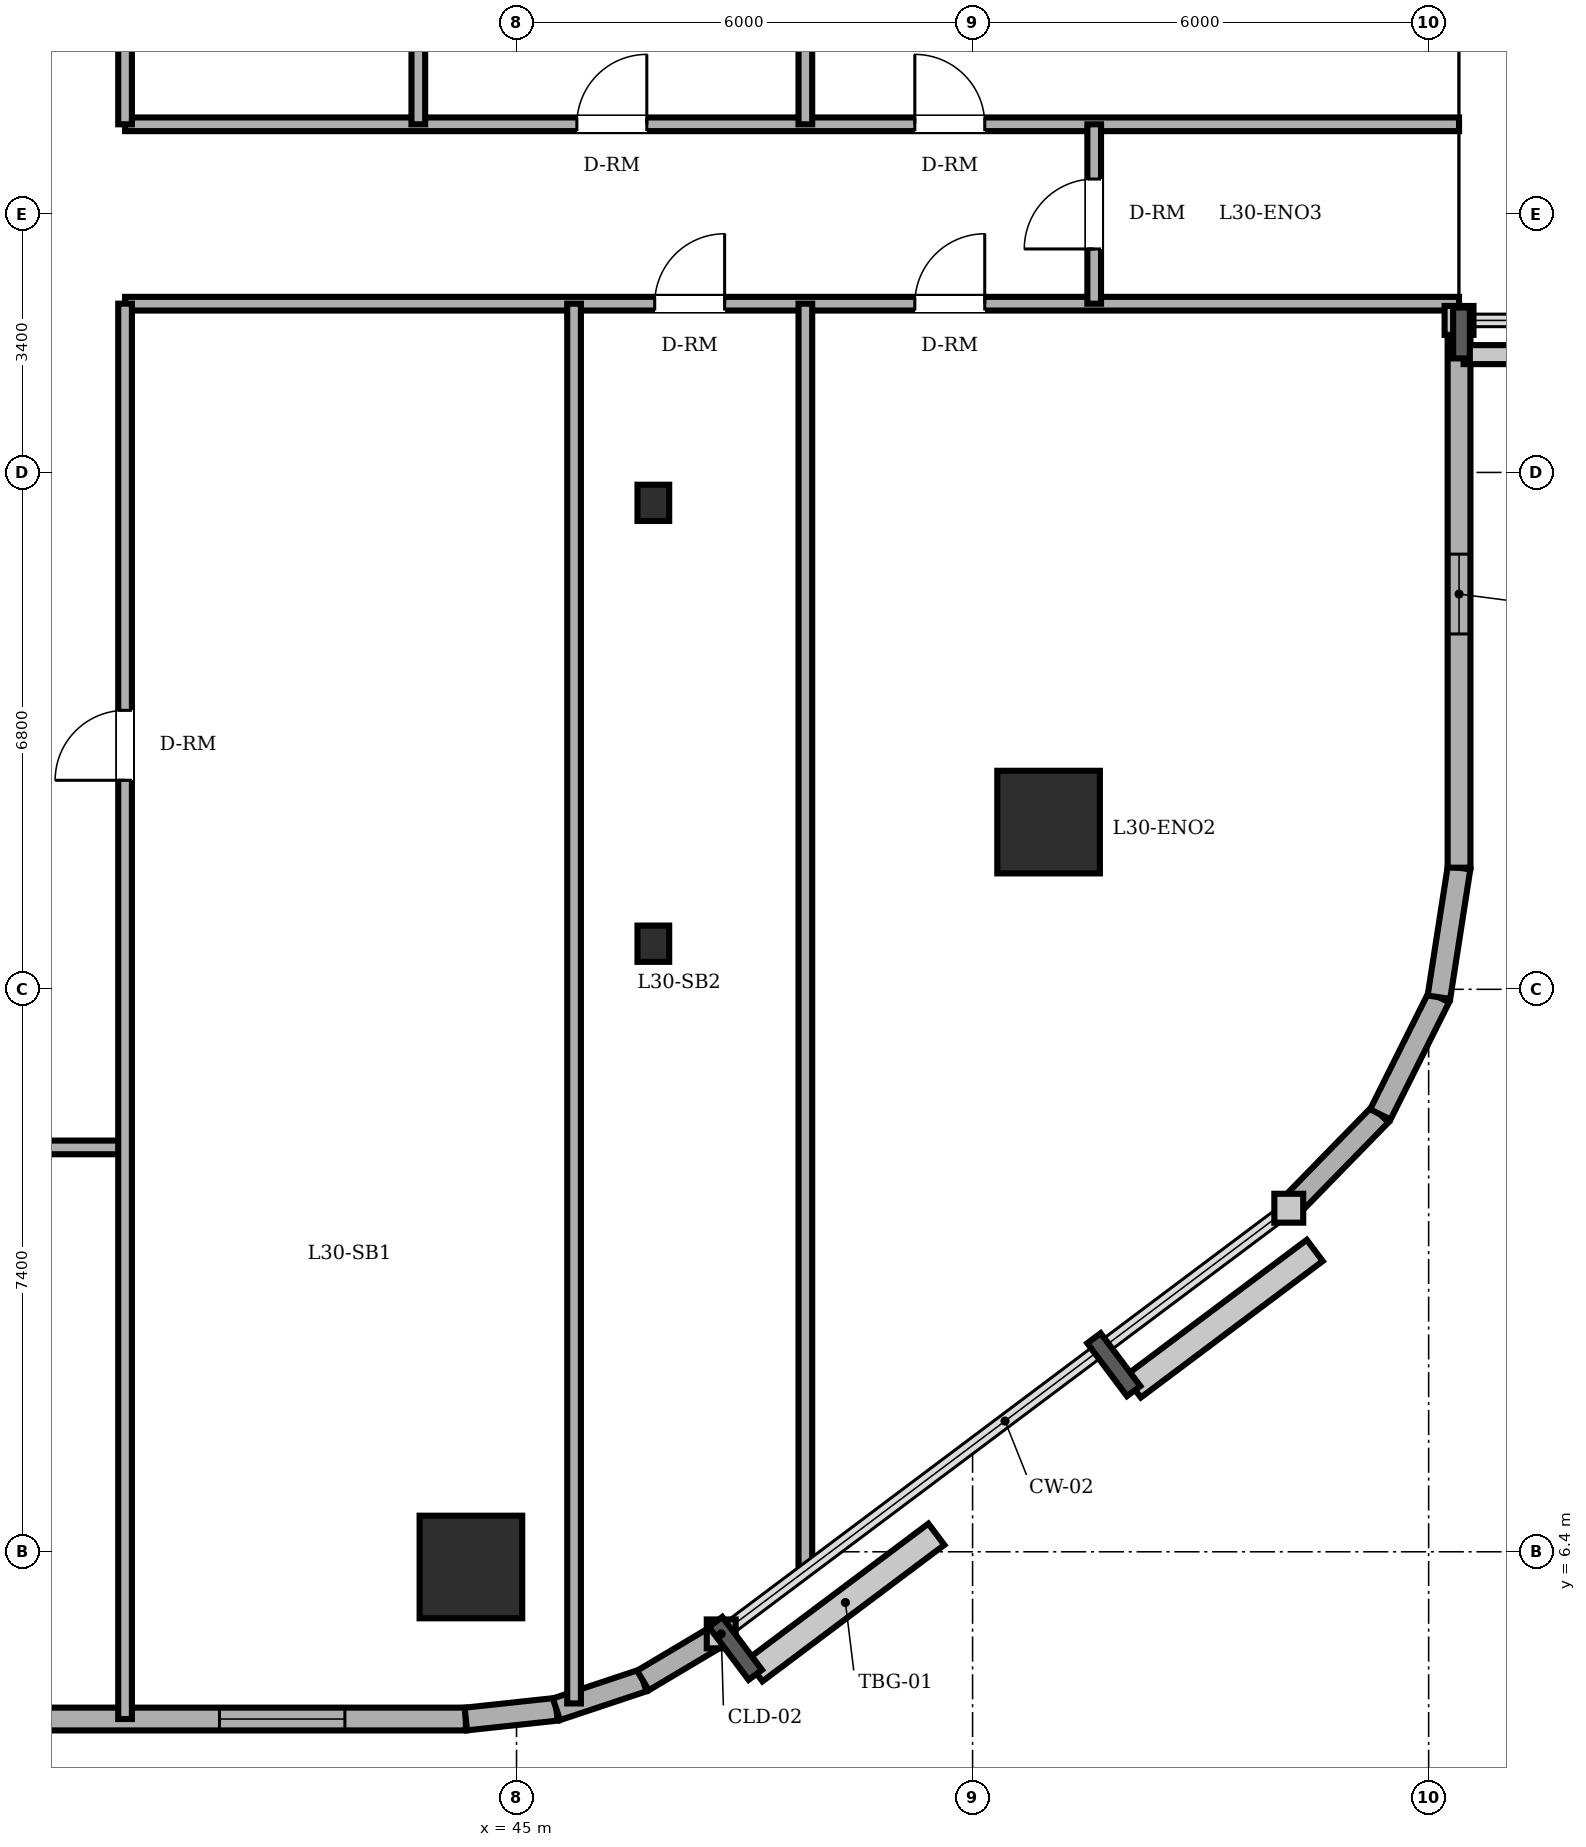
"""IFC4 building model, lengths in metres.
Left out: names, types, materials, properties, quantities, classifications, styles, units other than length and angle.
Written with IfcOpenShell. Run it as: python <this file> out.ifc"""

import sys

from ifc_helpers import new_model, si_unit, direction, frame, frame_2d, origin, origin_2d, place, context, subcontext, project, spatial, rectangle, circle, i_section, extrude, element, fill, save


model = new_model("IFC4")
c1 = context("Model", 3, precision=1e-05, world=origin(), true_north=direction((0.0, 1.0)))
c2 = subcontext(c1, "Body", "Model", "MODEL_VIEW")
j1 = project(units=[si_unit("LENGTHUNIT", "METRE"), si_unit("PLANEANGLEUNIT", "RADIAN")], contexts=[c1])
p1 = place(None, origin())
s1 = spatial("IfcSite", under=j1, at=p1, CompositionType="ELEMENT")
p2 = place(p1, origin())
s2 = spatial("IfcBuilding", under=s1, at=p2, CompositionType="ELEMENT")
p3 = place(p2, frame((0.0, 0.0, 115.1)))
s3 = spatial("IfcBuildingStorey", under=s2, at=p3, CompositionType="ELEMENT", Elevation=115.1)
for number, where, z_axis, x_axis in (
    (1, (44.4, 6.2, 0.0), (0.0, 0.0, 1.0), (1.0, 0.0, 0.0)),
    (2, (52.0, 16.0, 0.0), (0.0, 0.0, 1.0), (1.0, 0.0, 0.0)),
):
    element("IfcColumn", number, at=place(p3, frame(where, z_axis=z_axis, x_axis=x_axis)), inside=s3, PredefinedType="COLUMN", context=c2, shape_type="SweptSolid", body=[
        extrude(circle(Radius=0.675, at=origin_2d()), origin(), (0.0, 0.0, 1.0), 3.6),
    ])
for number, where, z_axis, x_axis in (
    (3, (46.8, 14.4, 0.0), (0.0, 0.0, 1.0), (1.0, 0.0, 0.0)),
    (4, (46.8, 20.2, 0.0), (0.0, 0.0, 1.0), (1.0, 0.0, 0.0)),
):
    element("IfcColumn", number, at=place(p3, frame(where, z_axis=z_axis, x_axis=x_axis)), inside=s3, PredefinedType="COLUMN", context=c2, shape_type="SweptSolid", body=[
        extrude(i_section(OverallWidth=0.417, OverallDepth=0.477, WebThickness=0.036, FlangeThickness=0.057, FilletRadius=0.015, at=origin_2d()), origin(), (0.0, 0.0, 1.0), 3.6),
    ])
p4 = place(p3, frame((14.4, 4.2, 0.0), z_axis=(0.0, 0.0, 1.0), x_axis=(1.0, 0.0, 0.0)))
e5 = element("IfcWall", 5, at=p4, inside=s3, PredefinedType="SOLIDWALL", context=c2, shape_type="SweptSolid", body=[
    extrude(rectangle(XDim=29.933, YDim=0.3, at=frame_2d((14.967, 0.0))), origin(), (0.0, 0.0, 1.0), 3.4),
])
p5 = place(p4, frame((6.725, 0.0, 0.0)))
e6 = element("IfcOpeningElement", 6, at=p5, cuts=e5, PredefinedType="OPENING", context=c2, shape_type="SweptSolid", body=[
    extrude(rectangle(XDim=0.95, YDim=2.2, at=frame_2d((0.475, 1.1))), frame((0.0, 0.16, 0.0), z_axis=(0.0, -1.0, 0.0), x_axis=(1.0, 0.0, 0.0)), (0.0, 0.0, 1.0), 0.32),
])
p6 = place(p4, frame((2.808, 0.0, 0.85)))
e7 = element("IfcOpeningElement", 7, at=p6, cuts=e5, PredefinedType="OPENING", context=c2, shape_type="SweptSolid", body=[
    extrude(rectangle(XDim=1.65, YDim=1.55, at=frame_2d((0.825, 0.775))), frame((0.0, 0.16, 0.0), z_axis=(0.0, -1.0, 0.0), x_axis=(1.0, 0.0, 0.0)), (0.0, 0.0, 1.0), 0.32),
])
p7 = place(p4, frame((11.275, 0.0, 0.85)))
e8 = element("IfcOpeningElement", 8, at=p7, cuts=e5, PredefinedType="OPENING", context=c2, shape_type="SweptSolid", body=[
    extrude(rectangle(XDim=1.65, YDim=1.55, at=frame_2d((0.825, 0.775))), frame((0.0, 0.16, 0.0), z_axis=(0.0, -1.0, 0.0), x_axis=(1.0, 0.0, 0.0)), (0.0, 0.0, 1.0), 0.32),
])
p8 = place(p4, frame((16.992, 0.0, 0.85)))
e9 = element("IfcOpeningElement", 9, at=p8, cuts=e5, PredefinedType="OPENING", context=c2, shape_type="SweptSolid", body=[
    extrude(rectangle(XDim=1.65, YDim=1.55, at=frame_2d((0.825, 0.775))), frame((0.0, 0.16, 0.0), z_axis=(0.0, -1.0, 0.0), x_axis=(1.0, 0.0, 0.0)), (0.0, 0.0, 1.0), 0.32),
])
p9 = place(p4, frame((20.808, 0.0, 0.85)))
e10 = element("IfcOpeningElement", 10, at=p9, cuts=e5, PredefinedType="OPENING", context=c2, shape_type="SweptSolid", body=[
    extrude(rectangle(XDim=1.65, YDim=1.55, at=frame_2d((0.825, 0.775))), frame((0.0, 0.16, 0.0), z_axis=(0.0, -1.0, 0.0), x_axis=(1.0, 0.0, 0.0)), (0.0, 0.0, 1.0), 0.32),
])
p10 = place(p4, frame((26.692, 0.0, 0.85)))
e11 = element("IfcOpeningElement", 11, at=p10, cuts=e5, PredefinedType="OPENING", context=c2, shape_type="SweptSolid", body=[
    extrude(rectangle(XDim=1.65, YDim=1.55, at=frame_2d((0.825, 0.775))), frame((0.0, 0.16, 0.0), z_axis=(0.0, -1.0, 0.0), x_axis=(1.0, 0.0, 0.0)), (0.0, 0.0, 1.0), 0.32),
])
p11 = place(p3, frame((44.333, 4.2, 0.0), z_axis=(0.0, 0.0, 1.0), x_axis=(0.994289103787, 0.106720092254, 0.0)))
e12 = element("IfcWall", 12, at=p11, inside=s3, PredefinedType="SOLIDWALL", context=c2, shape_type="SweptSolid", body=[
    extrude(rectangle(XDim=1.199, YDim=0.3, at=frame_2d((0.599, 0.0))), origin(), (0.0, 0.0, 1.0), 3.4),
])
p12 = place(p3, frame((45.525, 4.328, 0.0), z_axis=(0.0, 0.0, 1.0), x_axis=(0.948744332129, 0.316044604847, 0.0)))
e13 = element("IfcWall", 13, at=p12, inside=s3, PredefinedType="SOLIDWALL", context=c2, shape_type="SweptSolid", body=[
    extrude(rectangle(XDim=1.2, YDim=0.3, at=frame_2d((0.6, 0.0))), origin(), (0.0, 0.0, 1.0), 3.4),
])
p13 = place(p3, frame((46.663, 4.707, 0.0), z_axis=(0.0, 0.0, 1.0), x_axis=(0.859320591642, 0.511437308749, 0.0)))
e14 = element("IfcWall", 14, at=p13, inside=s3, PredefinedType="SOLIDWALL", context=c2, shape_type="SweptSolid", body=[
    extrude(rectangle(XDim=1.199, YDim=0.3, at=frame_2d((0.599, 0.0))), origin(), (0.0, 0.0, 1.0), 3.4),
])
for number, where, z_axis, x_axis in (
    (15, (55.16, 10.92, 0.0), (0.0, 0.0, 1.0), (0.698, 0.716, 0.0)),
    (16, (56.364, 12.154, 0.0), (0.0, 0.0, 1.0), (0.447, 0.894, 0.0)),
):
    element("IfcWall", number, at=place(p3, frame(where, z_axis=z_axis, x_axis=x_axis)), inside=s3, PredefinedType="SOLIDWALL", context=c2, shape_type="SweptSolid", body=[
        extrude(rectangle(XDim=1.724, YDim=0.3, at=frame_2d((0.862, 0.0))), origin(), (0.0, 0.0, 1.0), 3.4),
    ])
p14 = place(p3, frame((57.135, 13.696, 0.0), z_axis=(0.0, 0.0, 1.0), x_axis=(0.153620989032, 0.988129845581, 0.0)))
e17 = element("IfcWall", 17, at=p14, inside=s3, PredefinedType="SOLIDWALL", context=c2, shape_type="SweptSolid", body=[
    extrude(rectangle(XDim=1.724, YDim=0.3, at=frame_2d((0.862, 0.0))), origin(), (0.0, 0.0, 1.0), 3.4),
])
p15 = place(p3, frame((57.4, 15.4, 0.0), z_axis=(0.0, 0.0, 1.0), x_axis=(0.0, 1.0, 0.0)))
e18 = element("IfcWall", 18, at=p15, inside=s3, PredefinedType="SOLIDWALL", context=c2, shape_type="SweptSolid", body=[
    extrude(rectangle(XDim=7.2, YDim=0.3, at=frame_2d((3.6, 0.0))), origin(), (0.0, 0.0, 1.0), 3.4),
])
p16 = place(p15, frame((3.075, 0.0, 0.85)))
e19 = element("IfcOpeningElement", 19, at=p16, cuts=e18, PredefinedType="OPENING", context=c2, shape_type="SweptSolid", body=[
    extrude(rectangle(XDim=1.05, YDim=1.55, at=frame_2d((0.525, 0.775))), frame((0.0, 0.16, 0.0), z_axis=(0.0, -1.0, 0.0), x_axis=(1.0, 0.0, 0.0)), (0.0, 0.0, 1.0), 0.32),
])
p17 = place(p3, frame((8.8, 11.72, 0.0), z_axis=(0.0, 0.0, 1.0), x_axis=(1.0, 0.0, 0.0)))
e20 = element("IfcWall", 20, at=p17, inside=s3, PredefinedType="PARTITIONING", context=c2, shape_type="SweptSolid", body=[
    extrude(rectangle(XDim=31.05, YDim=0.18, at=frame_2d((15.525, 0.0))), origin(), (0.0, 0.0, 1.0), 3.4),
])
p18 = place(p17, frame((17.24, 0.0, 0.0)))
e21 = element("IfcOpeningElement", 21, at=p18, cuts=e20, PredefinedType="OPENING", context=c2, shape_type="SweptSolid", body=[
    extrude(rectangle(XDim=0.92, YDim=2.1, at=frame_2d((0.46, 1.05))), frame((0.0, 0.1, 0.0), z_axis=(0.0, -1.0, 0.0), x_axis=(1.0, 0.0, 0.0)), (0.0, 0.0, 1.0), 0.2),
])
p19 = place(p17, frame((8.04, 0.0, 0.0)))
e22 = element("IfcOpeningElement", 22, at=p19, cuts=e20, PredefinedType="OPENING", context=c2, shape_type="SweptSolid", body=[
    extrude(rectangle(XDim=0.92, YDim=2.1, at=frame_2d((0.46, 1.05))), frame((0.0, 0.1, 0.0), z_axis=(0.0, -1.0, 0.0), x_axis=(1.0, 0.0, 0.0)), (0.0, 0.0, 1.0), 0.2),
])
p20 = place(p17, frame((24.605, 0.0, 0.0)))
e23 = element("IfcOpeningElement", 23, at=p20, cuts=e20, PredefinedType="OPENING", context=c2, shape_type="SweptSolid", body=[
    extrude(rectangle(XDim=0.92, YDim=2.1, at=frame_2d((0.46, 1.05))), frame((0.0, 0.1, 0.0), z_axis=(0.0, -1.0, 0.0), x_axis=(1.0, 0.0, 0.0)), (0.0, 0.0, 1.0), 0.2),
])
p21 = place(p3, frame((39.85, 22.82, 0.0), z_axis=(0.0, 0.0, 1.0), x_axis=(1.0, 0.0, 0.0)))
e24 = element("IfcWall", 24, at=p21, inside=s3, PredefinedType="PARTITIONING", context=c2, shape_type="SweptSolid", body=[
    extrude(rectangle(XDim=17.55, YDim=0.18, at=frame_2d((8.775, 0.0))), origin(), (0.0, 0.0, 1.0), 3.4),
])
p22 = place(p21, frame((6.968, 0.0, 0.0)))
e25 = element("IfcOpeningElement", 25, at=p22, cuts=e24, PredefinedType="OPENING", context=c2, shape_type="SweptSolid", body=[
    extrude(rectangle(XDim=0.92, YDim=2.1, at=frame_2d((0.46, 1.05))), frame((0.0, 0.1, 0.0), z_axis=(0.0, -1.0, 0.0), x_axis=(1.0, 0.0, 0.0)), (0.0, 0.0, 1.0), 0.2),
])
p23 = place(p21, frame((10.39, 0.0, 0.0)))
e26 = element("IfcOpeningElement", 26, at=p23, cuts=e24, PredefinedType="OPENING", context=c2, shape_type="SweptSolid", body=[
    extrude(rectangle(XDim=0.92, YDim=2.1, at=frame_2d((0.46, 1.05))), frame((0.0, 0.1, 0.0), z_axis=(0.0, -1.0, 0.0), x_axis=(1.0, 0.0, 0.0)), (0.0, 0.0, 1.0), 0.2),
])
p24 = place(p3, frame((39.85, 25.18, 0.0), z_axis=(0.0, 0.0, 1.0), x_axis=(1.0, 0.0, 0.0)))
e27 = element("IfcWall", 27, at=p24, inside=s3, PredefinedType="PARTITIONING", context=c2, shape_type="SweptSolid", body=[
    extrude(rectangle(XDim=17.55, YDim=0.18, at=frame_2d((8.775, 0.0))), origin(), (0.0, 0.0, 1.0), 3.4),
])
p25 = place(p24, frame((5.944, 0.0, 0.0)))
e28 = element("IfcOpeningElement", 28, at=p25, cuts=e27, PredefinedType="OPENING", context=c2, shape_type="SweptSolid", body=[
    extrude(rectangle(XDim=0.92, YDim=2.1, at=frame_2d((0.46, 1.05))), frame((0.0, 0.1, 0.0), z_axis=(0.0, -1.0, 0.0), x_axis=(1.0, 0.0, 0.0)), (0.0, 0.0, 1.0), 0.2),
])
p26 = place(p24, frame((10.39, 0.0, 0.0)))
e29 = element("IfcOpeningElement", 29, at=p26, cuts=e27, PredefinedType="OPENING", context=c2, shape_type="SweptSolid", body=[
    extrude(rectangle(XDim=0.92, YDim=2.1, at=frame_2d((0.46, 1.05))), frame((0.0, 0.1, 0.0), z_axis=(0.0, -1.0, 0.0), x_axis=(1.0, 0.0, 0.0)), (0.0, 0.0, 1.0), 0.2),
])
p27 = place(p3, frame((39.85, 4.2, 0.0), z_axis=(0.0, 0.0, 1.0), x_axis=(0.0, 1.0, 0.0)))
e30 = element("IfcWall", 30, at=p27, inside=s3, PredefinedType="PARTITIONING", context=c2, shape_type="SweptSolid", body=[
    extrude(rectangle(XDim=18.62, YDim=0.18, at=frame_2d((9.31, 0.0))), origin(), (0.0, 0.0, 1.0), 3.4),
])
p28 = place(p27, frame((12.35, 0.0, 0.0)))
e31 = element("IfcOpeningElement", 31, at=p28, cuts=e30, PredefinedType="OPENING", context=c2, shape_type="SweptSolid", body=[
    extrude(rectangle(XDim=0.92, YDim=2.1, at=frame_2d((0.46, 1.05))), frame((0.0, 0.1, 0.0), z_axis=(0.0, -1.0, 0.0), x_axis=(1.0, 0.0, 0.0)), (0.0, 0.0, 1.0), 0.2),
])
p29 = place(p3, frame((39.85, 25.18, 0.0), z_axis=(0.0, 0.0, 1.0), x_axis=(0.0, 1.0, 0.0)))
e32 = element("IfcWall", 32, at=p29, inside=s3, PredefinedType="PARTITIONING", context=c2, shape_type="SweptSolid", body=[
    extrude(rectangle(XDim=18.62, YDim=0.18, at=frame_2d((9.31, 0.0))), origin(), (0.0, 0.0, 1.0), 3.4),
])
p30 = place(p29, frame((5.35, 0.0, 0.0)))
e33 = element("IfcOpeningElement", 33, at=p30, cuts=e32, PredefinedType="OPENING", context=c2, shape_type="SweptSolid", body=[
    extrude(rectangle(XDim=0.92, YDim=2.1, at=frame_2d((0.46, 1.05))), frame((0.0, 0.1, 0.0), z_axis=(0.0, -1.0, 0.0), x_axis=(1.0, 0.0, 0.0)), (0.0, 0.0, 1.0), 0.2),
])
p31 = place(p3, frame((43.708, 25.18, 0.0), z_axis=(0.0, 0.0, 1.0), x_axis=(0.0, 1.0, 0.0)))
e34 = element("IfcWall", 34, at=p31, inside=s3, PredefinedType="PARTITIONING", context=c2, shape_type="SweptSolid", body=[
    extrude(rectangle(XDim=18.62, YDim=0.18, at=frame_2d((9.31, 0.0))), origin(), (0.0, 0.0, 1.0), 3.4),
])
p32 = place(p3, frame((45.757, 4.405, 0.0), z_axis=(0.0, 0.0, 1.0), x_axis=(0.0, 1.0, 0.0)))
e35 = element("IfcWall", 35, at=p32, inside=s3, PredefinedType="PARTITIONING", context=c2, shape_type="SweptSolid", body=[
    extrude(rectangle(XDim=18.415, YDim=0.18, at=frame_2d((9.208, 0.0))), origin(), (0.0, 0.0, 1.0), 2.882),
])
for number, where, z_axis, x_axis in (
    (36, (48.8, 6.15, 0.0), (0.0, 0.0, 1.0), (0.0, 1.0, 0.0)),
    (37, (48.8, 25.18, 0.0), (0.0, 0.0, 1.0), (0.0, 1.0, 0.0)),
):
    element("IfcWall", number, at=place(p3, frame(where, z_axis=z_axis, x_axis=x_axis)), inside=s3, PredefinedType="PARTITIONING", context=c2, shape_type="SweptSolid", body=[
        extrude(rectangle(XDim=16.67, YDim=0.18, at=frame_2d((8.335, 0.0))), origin(), (0.0, 0.0, 1.0), 3.4),
    ])
p33 = place(p3, frame((52.6, 22.82, 0.0), z_axis=(0.0, 0.0, 1.0), x_axis=(0.0, 1.0, 0.0)))
e38 = element("IfcWall", 38, at=p33, inside=s3, PredefinedType="PARTITIONING", context=c2, shape_type="SweptSolid", body=[
    extrude(rectangle(XDim=2.36, YDim=0.18, at=frame_2d((1.18, 0.0))), origin(), (0.0, 0.0, 1.0), 3.4),
])
p34 = place(p33, frame((0.72, 0.0, 0.0)))
e39 = element("IfcOpeningElement", 39, at=p34, cuts=e38, PredefinedType="OPENING", context=c2, shape_type="SweptSolid", body=[
    extrude(rectangle(XDim=0.92, YDim=2.1, at=frame_2d((0.46, 1.05))), frame((0.0, 0.1, 0.0), z_axis=(0.0, -1.0, 0.0), x_axis=(1.0, 0.0, 0.0)), (0.0, 0.0, 1.0), 0.2),
])
p35 = place(p10, origin())
e40 = element("IfcWindow", 40, at=p35, inside=s3, PartitioningType="DOUBLE_PANEL_VERTICAL", PredefinedType="WINDOW", context=c2, shape_type="SweptSolid", body=[
    extrude(rectangle(XDim=1.65, YDim=1.55, at=frame_2d((0.825, 0.775))), frame((0.0, 0.03, 0.0), z_axis=(0.0, -1.0, 0.0), x_axis=(1.0, 0.0, 0.0)), (0.0, 0.0, 1.0), 0.06),
])
fill(e11, e40)
p36 = place(p16, origin())
e41 = element("IfcWindow", 41, at=p36, inside=s3, PartitioningType="SINGLE_PANEL", PredefinedType="WINDOW", context=c2, shape_type="SweptSolid", body=[
    extrude(rectangle(XDim=1.05, YDim=1.55, at=frame_2d((0.525, 0.775))), frame((0.0, 0.03, 0.0), z_axis=(0.0, -1.0, 0.0), x_axis=(1.0, 0.0, 0.0)), (0.0, 0.0, 1.0), 0.06),
])
fill(e19, e41)
p37 = place(p25, origin())
e42 = element("IfcDoor", 42, at=p37, inside=s3, OperationType="SINGLE_SWING_RIGHT", PredefinedType="DOOR", context=c2, shape_type="SweptSolid", body=[
    extrude(rectangle(XDim=0.92, YDim=2.1, at=frame_2d((0.46, 1.05))), frame((0.0, 0.025, 0.0), z_axis=(0.0, -1.0, 0.0), x_axis=(1.0, 0.0, 0.0)), (0.0, 0.0, 1.0), 0.05),
])
fill(e28, e42)
p38 = place(p28, origin())
e43 = element("IfcDoor", 43, at=p38, inside=s3, OperationType="SINGLE_SWING_LEFT", PredefinedType="DOOR", context=c2, shape_type="SweptSolid", body=[
    extrude(rectangle(XDim=0.92, YDim=2.1, at=frame_2d((0.46, 1.05))), frame((0.0, 0.025, 0.0), z_axis=(0.0, -1.0, 0.0), x_axis=(1.0, 0.0, 0.0)), (0.0, 0.0, 1.0), 0.05),
])
fill(e31, e43)
p39 = place(p22, origin())
e44 = element("IfcDoor", 44, at=p39, inside=s3, OperationType="SINGLE_SWING_RIGHT", PredefinedType="DOOR", context=c2, shape_type="SweptSolid", body=[
    extrude(rectangle(XDim=0.92, YDim=2.1, at=frame_2d((0.46, 1.05))), frame((0.0, 0.025, 0.0), z_axis=(0.0, -1.0, 0.0), x_axis=(1.0, 0.0, 0.0)), (0.0, 0.0, 1.0), 0.05),
])
fill(e25, e44)
p40 = place(p26, origin())
e45 = element("IfcDoor", 45, at=p40, inside=s3, OperationType="SINGLE_SWING_LEFT", PredefinedType="DOOR", context=c2, shape_type="SweptSolid", body=[
    extrude(rectangle(XDim=0.92, YDim=2.1, at=frame_2d((0.46, 1.05))), frame((0.0, 0.025, 0.0), z_axis=(0.0, -1.0, 0.0), x_axis=(1.0, 0.0, 0.0)), (0.0, 0.0, 1.0), 0.05),
])
fill(e29, e45)
p41 = place(p23, origin())
e46 = element("IfcDoor", 46, at=p41, inside=s3, OperationType="SINGLE_SWING_RIGHT", PredefinedType="DOOR", context=c2, shape_type="SweptSolid", body=[
    extrude(rectangle(XDim=0.92, YDim=2.1, at=frame_2d((0.46, 1.05))), frame((0.0, 0.025, 0.0), z_axis=(0.0, -1.0, 0.0), x_axis=(1.0, 0.0, 0.0)), (0.0, 0.0, 1.0), 0.05),
])
fill(e26, e46)
p42 = place(p34, origin())
e47 = element("IfcDoor", 47, at=p42, inside=s3, OperationType="SINGLE_SWING_LEFT", PredefinedType="DOOR", context=c2, shape_type="SweptSolid", body=[
    extrude(rectangle(XDim=0.92, YDim=2.1, at=frame_2d((0.46, 1.05))), frame((0.0, 0.025, 0.0), z_axis=(0.0, -1.0, 0.0), x_axis=(1.0, 0.0, 0.0)), (0.0, 0.0, 1.0), 0.05),
])
fill(e39, e47)
save(model, sys.argv[1])
